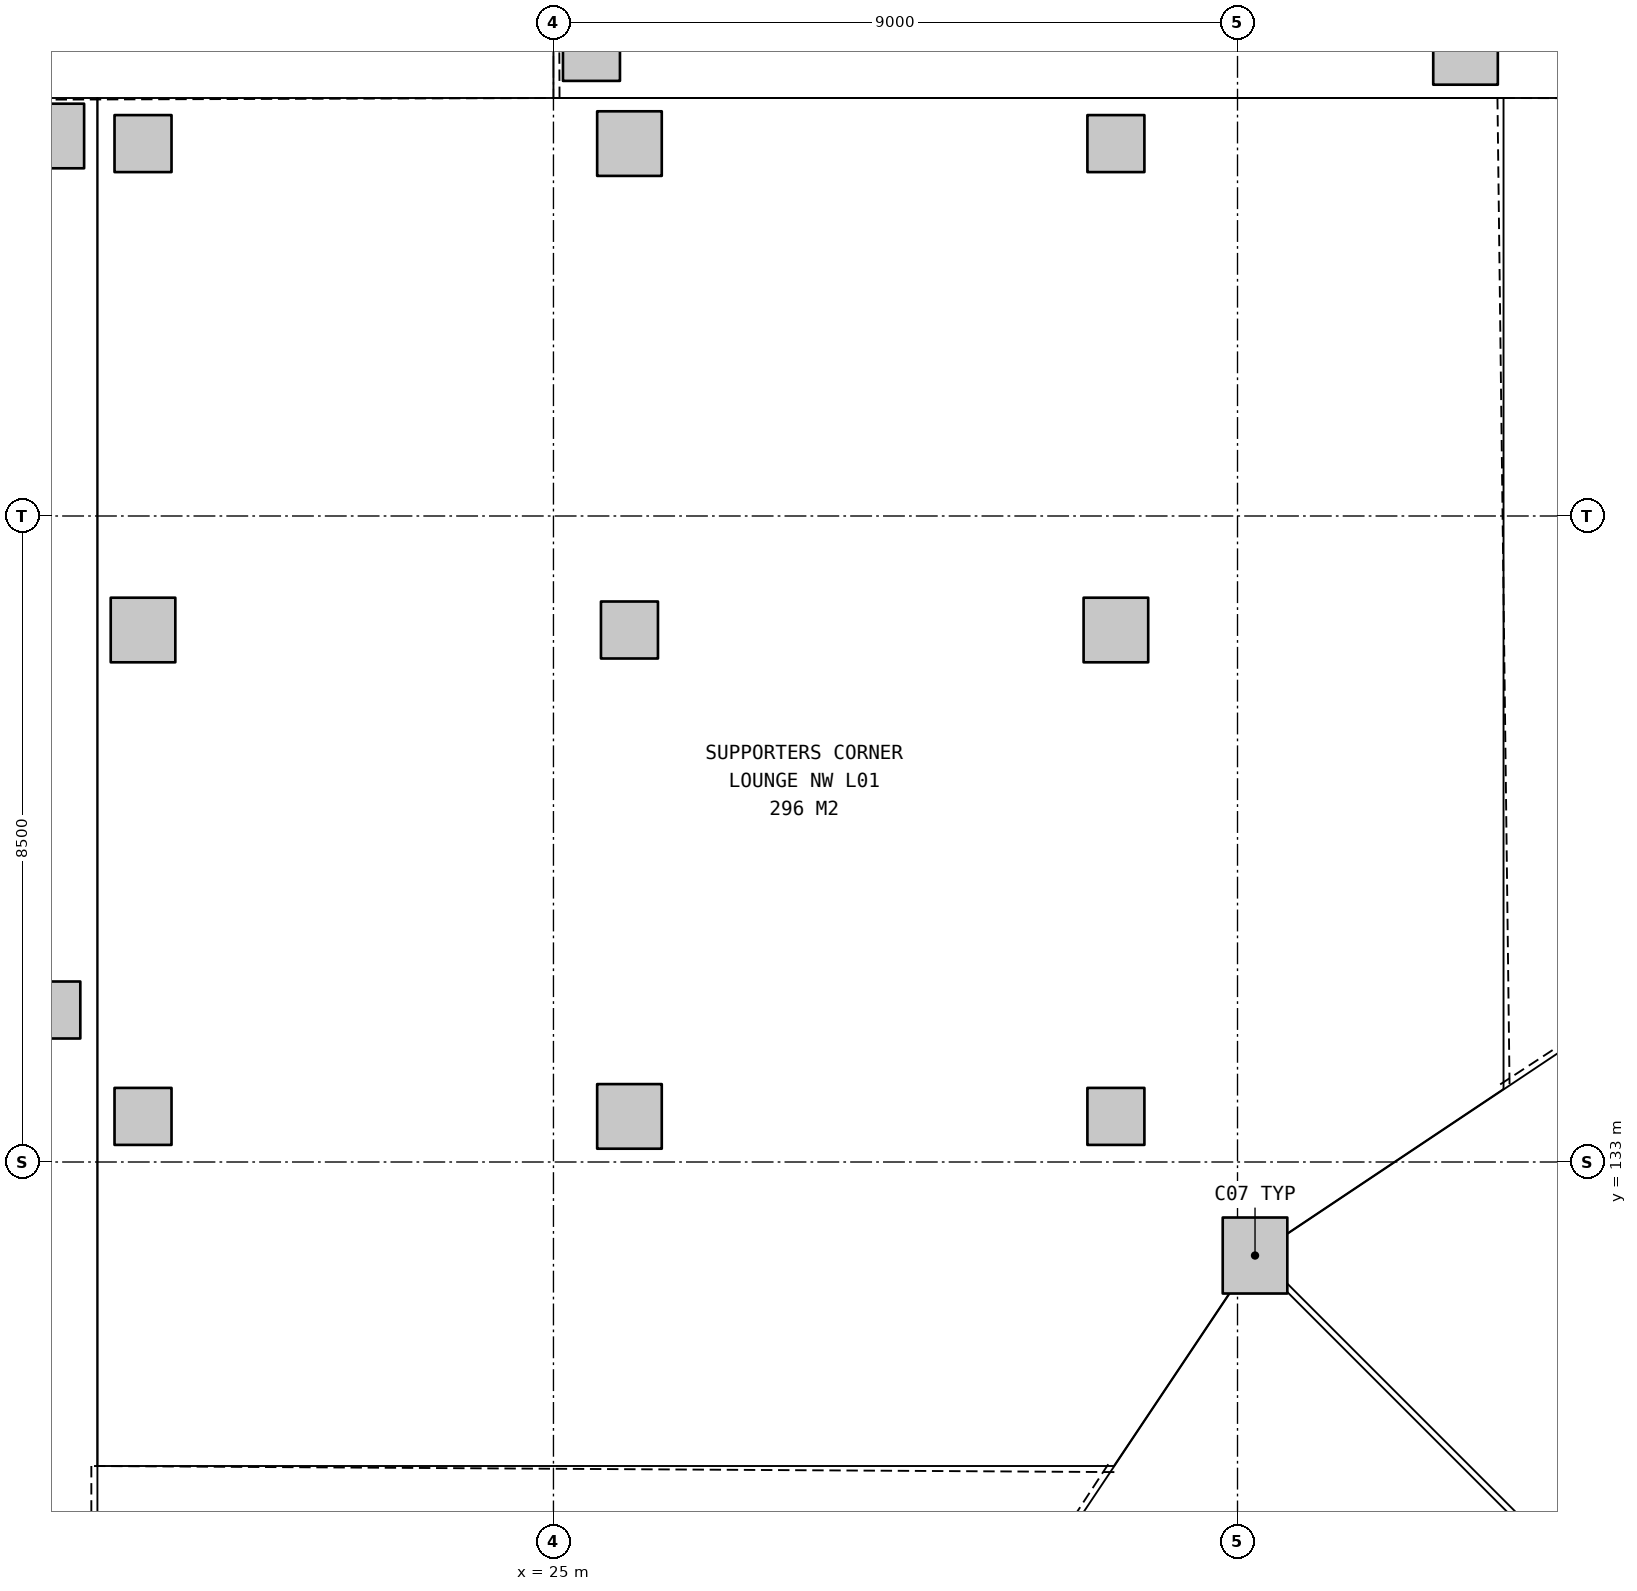
"""IFC4 building model, lengths in metres.
Left out: names, types, materials, properties, quantities, classifications, styles, units other than length and angle.
Written with IfcOpenShell. Run it as: python <this file> out.ifc"""

import sys

from ifc_helpers import new_model, si_unit, direction, frame, origin, origin_2d, place, context, subcontext, project, spatial, rectangle, extrude, element, save


model = new_model("IFC4")
c1 = context("Model", 3, precision=1e-05, world=origin(), true_north=direction((0.0, 1.0)))
c2 = subcontext(c1, "Body", "Model", "MODEL_VIEW")
j1 = project(units=[si_unit("LENGTHUNIT", "METRE"), si_unit("PLANEANGLEUNIT", "RADIAN")], contexts=[c1])
p1 = place(None, origin())
s1 = spatial("IfcSite", under=j1, at=p1, CompositionType="ELEMENT")
p2 = place(p1, origin())
s2 = spatial("IfcBuilding", under=s1, at=p2, CompositionType="ELEMENT")
p3 = place(p2, frame((0.0, 0.0, 5.4)))
s3 = spatial("IfcBuildingStorey", under=s2, at=p3, CompositionType="ELEMENT", Elevation=5.4)
p4 = place(p3, frame((34.23, 131.77, 0.0), z_axis=(0.0, 0.0, 1.0), x_axis=(1.0, 0.0, 0.0)))
e1 = element("IfcColumn", 1, at=p4, inside=s3, PredefinedType="COLUMN", context=c2, shape_type="SweptSolid", body=[
    extrude(rectangle(XDim=0.85, YDim=1.0, at=origin_2d()), origin(), (0.0, 0.0, 1.0), 5.4),
])
p5 = place(p3, frame((18.4, 135.0, 0.0), z_axis=(0.0, 0.0, 1.0), x_axis=(1.0, 0.0, 0.0)))
e2 = element("IfcColumn", 2, at=p5, inside=s3, PredefinedType="COLUMN", context=c2, shape_type="SweptSolid", body=[
    extrude(rectangle(XDim=0.75, YDim=0.75, at=origin_2d()), origin(), (0.0, 0.0, 1.0), 5.4),
])
p6 = place(p3, frame((18.4, 146.5, 0.0), z_axis=(0.0, 0.0, 1.0), x_axis=(1.0, 0.0, 0.0)))
e3 = element("IfcColumn", 3, at=p6, inside=s3, PredefinedType="COLUMN", context=c2, shape_type="SweptSolid", body=[
    extrude(rectangle(XDim=0.85, YDim=0.85, at=origin_2d()), origin(), (0.0, 0.0, 1.0), 5.4),
])
p7 = place(p3, frame((25.5, 147.6, 0.0), z_axis=(0.0, 0.0, 1.0), x_axis=(1.0, 0.0, 0.0)))
e4 = element("IfcColumn", 4, at=p7, inside=s3, PredefinedType="COLUMN", context=c2, shape_type="SweptSolid", body=[
    extrude(rectangle(XDim=0.75, YDim=0.75, at=origin_2d()), origin(), (0.0, 0.0, 1.0), 5.4),
])
p8 = place(p3, frame((37.0, 147.6, 0.0), z_axis=(0.0, 0.0, 1.0), x_axis=(1.0, 0.0, 0.0)))
e5 = element("IfcColumn", 5, at=p8, inside=s3, PredefinedType="COLUMN", context=c2, shape_type="SweptSolid", body=[
    extrude(rectangle(XDim=0.85, YDim=0.85, at=origin_2d()), origin(), (0.0, 0.0, 1.0), 5.4),
])
p9 = place(p3, frame((19.6, 133.6, 0.0), z_axis=(0.0, 0.0, 1.0), x_axis=(1.0, 0.0, 0.0)))
e6 = element("IfcColumn", 6, at=p9, inside=s3, PredefinedType="COLUMN", context=c2, shape_type="SweptSolid", body=[
    extrude(rectangle(XDim=0.75, YDim=0.75, at=origin_2d()), origin(), (0.0, 0.0, 1.0), 5.4),
])
p10 = place(p3, frame((19.6, 140.0, 0.0), z_axis=(0.0, 0.0, 1.0), x_axis=(1.0, 0.0, 0.0)))
e7 = element("IfcColumn", 7, at=p10, inside=s3, PredefinedType="COLUMN", context=c2, shape_type="SweptSolid", body=[
    extrude(rectangle(XDim=0.85, YDim=0.85, at=origin_2d()), origin(), (0.0, 0.0, 1.0), 5.4),
])
p11 = place(p3, frame((19.6, 146.4, 0.0), z_axis=(0.0, 0.0, 1.0), x_axis=(1.0, 0.0, 0.0)))
e8 = element("IfcColumn", 8, at=p11, inside=s3, PredefinedType="COLUMN", context=c2, shape_type="SweptSolid", body=[
    extrude(rectangle(XDim=0.75, YDim=0.75, at=origin_2d()), origin(), (0.0, 0.0, 1.0), 5.4),
])
p12 = place(p3, frame((26.0, 133.6, 0.0), z_axis=(0.0, 0.0, 1.0), x_axis=(1.0, 0.0, 0.0)))
e9 = element("IfcColumn", 9, at=p12, inside=s3, PredefinedType="COLUMN", context=c2, shape_type="SweptSolid", body=[
    extrude(rectangle(XDim=0.85, YDim=0.85, at=origin_2d()), origin(), (0.0, 0.0, 1.0), 5.4),
])
p13 = place(p3, frame((26.0, 140.0, 0.0), z_axis=(0.0, 0.0, 1.0), x_axis=(1.0, 0.0, 0.0)))
e10 = element("IfcColumn", 10, at=p13, inside=s3, PredefinedType="COLUMN", context=c2, shape_type="SweptSolid", body=[
    extrude(rectangle(XDim=0.75, YDim=0.75, at=origin_2d()), origin(), (0.0, 0.0, 1.0), 5.4),
])
p14 = place(p3, frame((26.0, 146.4, 0.0), z_axis=(0.0, 0.0, 1.0), x_axis=(1.0, 0.0, 0.0)))
e11 = element("IfcColumn", 11, at=p14, inside=s3, PredefinedType="COLUMN", context=c2, shape_type="SweptSolid", body=[
    extrude(rectangle(XDim=0.85, YDim=0.85, at=origin_2d()), origin(), (0.0, 0.0, 1.0), 5.4),
])
p15 = place(p3, frame((32.4, 133.6, 0.0), z_axis=(0.0, 0.0, 1.0), x_axis=(1.0, 0.0, 0.0)))
e12 = element("IfcColumn", 12, at=p15, inside=s3, PredefinedType="COLUMN", context=c2, shape_type="SweptSolid", body=[
    extrude(rectangle(XDim=0.75, YDim=0.75, at=origin_2d()), origin(), (0.0, 0.0, 1.0), 5.4),
])
p16 = place(p3, frame((32.4, 140.0, 0.0), z_axis=(0.0, 0.0, 1.0), x_axis=(1.0, 0.0, 0.0)))
e13 = element("IfcColumn", 13, at=p16, inside=s3, PredefinedType="COLUMN", context=c2, shape_type="SweptSolid", body=[
    extrude(rectangle(XDim=0.85, YDim=0.85, at=origin_2d()), origin(), (0.0, 0.0, 1.0), 5.4),
])
p17 = place(p3, frame((32.4, 146.4, 0.0), z_axis=(0.0, 0.0, 1.0), x_axis=(1.0, 0.0, 0.0)))
e14 = element("IfcColumn", 14, at=p17, inside=s3, PredefinedType="COLUMN", context=c2, shape_type="SweptSolid", body=[
    extrude(rectangle(XDim=0.75, YDim=0.75, at=origin_2d()), origin(), (0.0, 0.0, 1.0), 5.4),
])
save(model, sys.argv[1])
